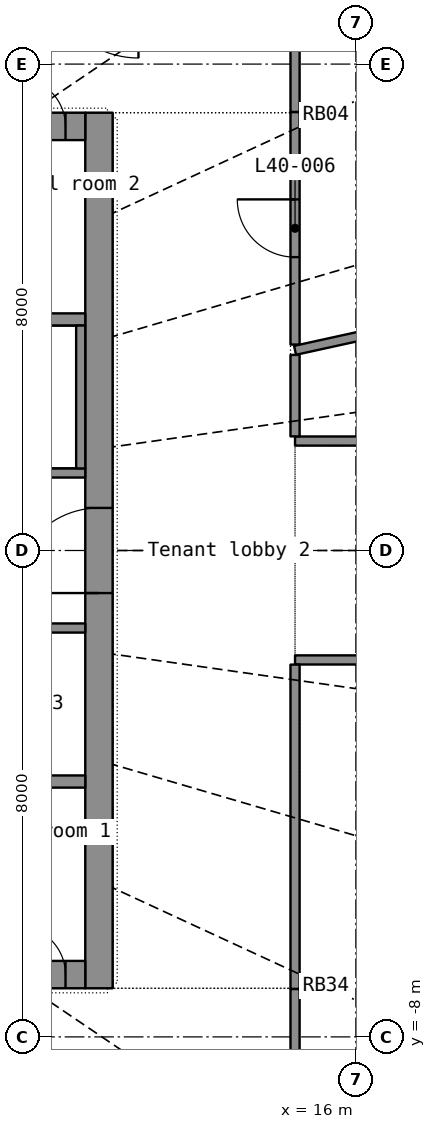
"""IFC4 building model, lengths in metres.
Left out: names, types, materials, properties, quantities, classifications, styles, units other than length and angle.
Written with IfcOpenShell. Run it as: python <this file> out.ifc"""

import sys

from ifc_helpers import new_model, si_unit, direction, frame, frame_2d, origin, place, context, subcontext, project, spatial, rectangle, extrude, element, fill, save


model = new_model("IFC4")
c1 = context("Model", 3, precision=1e-05, world=origin(), true_north=direction((0.0, 1.0)))
c2 = subcontext(c1, "Body", "Model", "MODEL_VIEW")
j1 = project(units=[si_unit("LENGTHUNIT", "METRE"), si_unit("PLANEANGLEUNIT", "RADIAN")], contexts=[c1])
p1 = place(None, origin())
s1 = spatial("IfcSite", under=j1, at=p1, CompositionType="ELEMENT")
p2 = place(p1, origin())
s2 = spatial("IfcBuilding", under=s1, at=p2, CompositionType="ELEMENT")
p3 = place(p2, frame((0.0, 0.0, 168.2)))
s3 = spatial("IfcBuildingStorey", under=s2, at=p3, CompositionType="ELEMENT", Elevation=168.2)
p4 = place(p3, frame((11.775, -7.2, 0.0), z_axis=(0.0, 0.0, 1.0), x_axis=(0.0, 1.0, 0.0)))
e1 = element("IfcWall", 1, at=p4, inside=s3, PredefinedType="SHEAR", context=c2, shape_type="SweptSolid", body=[
    extrude(rectangle(XDim=14.4, YDim=0.45, at=frame_2d((7.2, 0.0))), origin(), (0.0, 0.0, 1.0), 3.3),
])
p5 = place(p4, frame((6.5, 0.0, 0.0)))
e2 = element("IfcOpeningElement", 2, at=p5, cuts=e1, PredefinedType="OPENING", context=c2, shape_type="SweptSolid", body=[
    extrude(rectangle(XDim=1.4, YDim=2.2, at=frame_2d((0.7, 1.1))), frame((0.0, 0.235, 0.0), z_axis=(0.0, -1.0, 0.0), x_axis=(1.0, 0.0, 0.0)), (0.0, 0.0, 1.0), 0.47),
])
p6 = place(p3, frame((-11.55, -6.975, 0.0), z_axis=(0.0, 0.0, 1.0), x_axis=(1.0, 0.0, 0.0)))
e3 = element("IfcWall", 3, at=p6, inside=s3, PredefinedType="SHEAR", context=c2, shape_type="SweptSolid", body=[
    extrude(rectangle(XDim=23.1, YDim=0.45, at=frame_2d((11.55, 0.0))), origin(), (0.0, 0.0, 1.0), 3.3),
])
p7 = place(p6, frame((20.0, 0.0, 0.0)))
e4 = element("IfcOpeningElement", 4, at=p7, cuts=e3, PredefinedType="OPENING", context=c2, shape_type="SweptSolid", body=[
    extrude(rectangle(XDim=1.1, YDim=2.2, at=frame_2d((0.55, 1.1))), frame((0.0, 0.235, 0.0), z_axis=(0.0, -1.0, 0.0), x_axis=(1.0, 0.0, 0.0)), (0.0, 0.0, 1.0), 0.47),
])
p8 = place(p6, frame((4.1, 0.0, 0.0)))
e5 = element("IfcOpeningElement", 5, at=p8, cuts=e3, PredefinedType="OPENING", context=c2, shape_type="SweptSolid", body=[
    extrude(rectangle(XDim=0.9, YDim=2.1, at=frame_2d((0.45, 1.05))), frame((0.0, 0.235, 0.0), z_axis=(0.0, -1.0, 0.0), x_axis=(1.0, 0.0, 0.0)), (0.0, 0.0, 1.0), 0.47),
])
p9 = place(p6, frame((11.1, 0.0, 0.0)))
e6 = element("IfcOpeningElement", 6, at=p9, cuts=e3, PredefinedType="OPENING", context=c2, shape_type="SweptSolid", body=[
    extrude(rectangle(XDim=0.9, YDim=2.1, at=frame_2d((0.45, 1.05))), frame((0.0, 0.235, 0.0), z_axis=(0.0, -1.0, 0.0), x_axis=(1.0, 0.0, 0.0)), (0.0, 0.0, 1.0), 0.47),
])
p10 = place(p6, frame((17.1, 0.0, 0.0)))
e7 = element("IfcOpeningElement", 7, at=p10, cuts=e3, PredefinedType="OPENING", context=c2, shape_type="SweptSolid", body=[
    extrude(rectangle(XDim=0.9, YDim=2.1, at=frame_2d((0.45, 1.05))), frame((0.0, 0.235, 0.0), z_axis=(0.0, -1.0, 0.0), x_axis=(1.0, 0.0, 0.0)), (0.0, 0.0, 1.0), 0.47),
])
p11 = place(p6, frame((0.325, 0.0, 0.0)))
e8 = element("IfcOpeningElement", 8, at=p11, cuts=e3, PredefinedType="OPENING", context=c2, shape_type="SweptSolid", body=[
    extrude(rectangle(XDim=0.8, YDim=2.05, at=frame_2d((0.4, 1.025))), frame((0.0, 0.235, 0.0), z_axis=(0.0, -1.0, 0.0), x_axis=(1.0, 0.0, 0.0)), (0.0, 0.0, 1.0), 0.47),
])
p12 = place(p6, frame((21.975, 0.0, 0.0)))
e9 = element("IfcOpeningElement", 9, at=p12, cuts=e3, PredefinedType="OPENING", context=c2, shape_type="SweptSolid", body=[
    extrude(rectangle(XDim=0.8, YDim=2.05, at=frame_2d((0.4, 1.025))), frame((0.0, 0.235, 0.0), z_axis=(0.0, -1.0, 0.0), x_axis=(1.0, 0.0, 0.0)), (0.0, 0.0, 1.0), 0.47),
])
p13 = place(p3, frame((-11.55, 6.975, 0.0), z_axis=(0.0, 0.0, 1.0), x_axis=(1.0, 0.0, 0.0)))
e10 = element("IfcWall", 10, at=p13, inside=s3, PredefinedType="SHEAR", context=c2, shape_type="SweptSolid", body=[
    extrude(rectangle(XDim=23.1, YDim=0.45, at=frame_2d((11.55, 0.0))), origin(), (0.0, 0.0, 1.0), 3.3),
])
p14 = place(p13, frame((2.0, 0.0, 0.0)))
e11 = element("IfcOpeningElement", 11, at=p14, cuts=e10, PredefinedType="OPENING", context=c2, shape_type="SweptSolid", body=[
    extrude(rectangle(XDim=1.1, YDim=2.2, at=frame_2d((0.55, 1.1))), frame((0.0, 0.235, 0.0), z_axis=(0.0, -1.0, 0.0), x_axis=(1.0, 0.0, 0.0)), (0.0, 0.0, 1.0), 0.47),
])
p15 = place(p13, frame((6.0, 0.0, 0.0)))
e12 = element("IfcOpeningElement", 12, at=p15, cuts=e10, PredefinedType="OPENING", context=c2, shape_type="SweptSolid", body=[
    extrude(rectangle(XDim=1.1, YDim=2.2, at=frame_2d((0.55, 1.1))), frame((0.0, 0.235, 0.0), z_axis=(0.0, -1.0, 0.0), x_axis=(1.0, 0.0, 0.0)), (0.0, 0.0, 1.0), 0.47),
])
p16 = place(p13, frame((8.0, 0.0, 0.0)))
e13 = element("IfcOpeningElement", 13, at=p16, cuts=e10, PredefinedType="OPENING", context=c2, shape_type="SweptSolid", body=[
    extrude(rectangle(XDim=1.1, YDim=2.2, at=frame_2d((0.55, 1.1))), frame((0.0, 0.235, 0.0), z_axis=(0.0, -1.0, 0.0), x_axis=(1.0, 0.0, 0.0)), (0.0, 0.0, 1.0), 0.47),
])
p17 = place(p13, frame((10.0, 0.0, 0.0)))
e14 = element("IfcOpeningElement", 14, at=p17, cuts=e10, PredefinedType="OPENING", context=c2, shape_type="SweptSolid", body=[
    extrude(rectangle(XDim=1.1, YDim=2.2, at=frame_2d((0.55, 1.1))), frame((0.0, 0.235, 0.0), z_axis=(0.0, -1.0, 0.0), x_axis=(1.0, 0.0, 0.0)), (0.0, 0.0, 1.0), 0.47),
])
p18 = place(p13, frame((12.0, 0.0, 0.0)))
e15 = element("IfcOpeningElement", 15, at=p18, cuts=e10, PredefinedType="OPENING", context=c2, shape_type="SweptSolid", body=[
    extrude(rectangle(XDim=1.1, YDim=2.2, at=frame_2d((0.55, 1.1))), frame((0.0, 0.235, 0.0), z_axis=(0.0, -1.0, 0.0), x_axis=(1.0, 0.0, 0.0)), (0.0, 0.0, 1.0), 0.47),
])
p19 = place(p13, frame((14.0, 0.0, 0.0)))
e16 = element("IfcOpeningElement", 16, at=p19, cuts=e10, PredefinedType="OPENING", context=c2, shape_type="SweptSolid", body=[
    extrude(rectangle(XDim=1.1, YDim=2.2, at=frame_2d((0.55, 1.1))), frame((0.0, 0.235, 0.0), z_axis=(0.0, -1.0, 0.0), x_axis=(1.0, 0.0, 0.0)), (0.0, 0.0, 1.0), 0.47),
])
p20 = place(p13, frame((16.0, 0.0, 0.0)))
e17 = element("IfcOpeningElement", 17, at=p20, cuts=e10, PredefinedType="OPENING", context=c2, shape_type="SweptSolid", body=[
    extrude(rectangle(XDim=1.1, YDim=2.2, at=frame_2d((0.55, 1.1))), frame((0.0, 0.235, 0.0), z_axis=(0.0, -1.0, 0.0), x_axis=(1.0, 0.0, 0.0)), (0.0, 0.0, 1.0), 0.47),
])
p21 = place(p13, frame((18.0, 0.0, 0.0)))
e18 = element("IfcOpeningElement", 18, at=p21, cuts=e10, PredefinedType="OPENING", context=c2, shape_type="SweptSolid", body=[
    extrude(rectangle(XDim=1.1, YDim=2.2, at=frame_2d((0.55, 1.1))), frame((0.0, 0.235, 0.0), z_axis=(0.0, -1.0, 0.0), x_axis=(1.0, 0.0, 0.0)), (0.0, 0.0, 1.0), 0.47),
])
p22 = place(p13, frame((20.0, 0.0, 0.0)))
e19 = element("IfcOpeningElement", 19, at=p22, cuts=e10, PredefinedType="OPENING", context=c2, shape_type="SweptSolid", body=[
    extrude(rectangle(XDim=1.1, YDim=2.2, at=frame_2d((0.55, 1.1))), frame((0.0, 0.235, 0.0), z_axis=(0.0, -1.0, 0.0), x_axis=(1.0, 0.0, 0.0)), (0.0, 0.0, 1.0), 0.47),
])
p23 = place(p13, frame((4.1, 0.0, 0.0)))
e20 = element("IfcOpeningElement", 20, at=p23, cuts=e10, PredefinedType="OPENING", context=c2, shape_type="SweptSolid", body=[
    extrude(rectangle(XDim=0.9, YDim=2.1, at=frame_2d((0.45, 1.05))), frame((0.0, 0.235, 0.0), z_axis=(0.0, -1.0, 0.0), x_axis=(1.0, 0.0, 0.0)), (0.0, 0.0, 1.0), 0.47),
])
p24 = place(p13, frame((0.325, 0.0, 0.0)))
e21 = element("IfcOpeningElement", 21, at=p24, cuts=e10, PredefinedType="OPENING", context=c2, shape_type="SweptSolid", body=[
    extrude(rectangle(XDim=0.8, YDim=2.05, at=frame_2d((0.4, 1.025))), frame((0.0, 0.235, 0.0), z_axis=(0.0, -1.0, 0.0), x_axis=(1.0, 0.0, 0.0)), (0.0, 0.0, 1.0), 0.47),
])
p25 = place(p13, frame((21.975, 0.0, 0.0)))
e22 = element("IfcOpeningElement", 22, at=p25, cuts=e10, PredefinedType="OPENING", context=c2, shape_type="SweptSolid", body=[
    extrude(rectangle(XDim=0.8, YDim=2.05, at=frame_2d((0.4, 1.025))), frame((0.0, 0.235, 0.0), z_axis=(0.0, -1.0, 0.0), x_axis=(1.0, 0.0, 0.0)), (0.0, 0.0, 1.0), 0.47),
])
for number, where, z_axis, x_axis in (
    (23, (-11.55, -3.8, 0.0), (0.0, 0.0, 1.0), (1.0, 0.0, 0.0)),
    (24, (-11.55, 3.8, 0.0), (0.0, 0.0, 1.0), (1.0, 0.0, 0.0)),
):
    element("IfcWall", number, at=place(p3, frame(where, z_axis=z_axis, x_axis=x_axis)), inside=s3, PredefinedType="SHEAR", context=c2, shape_type="SweptSolid", body=[
        extrude(rectangle(XDim=23.1, YDim=0.2, at=frame_2d((11.55, 0.0))), origin(), (0.0, 0.0, 1.0), 3.3),
    ])
p26 = place(p3, frame((3.0, -1.275, 0.0), z_axis=(0.0, 0.0, 1.0), x_axis=(1.0, 0.0, 0.0)))
e25 = element("IfcWall", 25, at=p26, inside=s3, PredefinedType="PARTITIONING", context=c2, shape_type="SweptSolid", body=[
    extrude(rectangle(XDim=8.55, YDim=0.15, at=frame_2d((4.275, 0.0))), origin(), (0.0, 0.0, 1.0), 3.3),
])
p27 = place(p26, frame((0.812, 0.0, 0.0)))
e26 = element("IfcOpeningElement", 26, at=p27, cuts=e25, PredefinedType="OPENING", context=c2, shape_type="SweptSolid", body=[
    extrude(rectangle(XDim=0.85, YDim=2.1, at=frame_2d((0.425, 1.05))), frame((0.0, 0.085, 0.0), z_axis=(0.0, -1.0, 0.0), x_axis=(1.0, 0.0, 0.0)), (0.0, 0.0, 1.0), 0.17),
])
p28 = place(p26, frame((3.083, 0.0, 0.0)))
e27 = element("IfcOpeningElement", 27, at=p28, cuts=e25, PredefinedType="OPENING", context=c2, shape_type="SweptSolid", body=[
    extrude(rectangle(XDim=0.9, YDim=2.1, at=frame_2d((0.45, 1.05))), frame((0.0, 0.085, 0.0), z_axis=(0.0, -1.0, 0.0), x_axis=(1.0, 0.0, 0.0)), (0.0, 0.0, 1.0), 0.17),
])
p29 = place(p26, frame((6.12, 0.0, 0.0)))
e28 = element("IfcOpeningElement", 28, at=p29, cuts=e25, PredefinedType="OPENING", context=c2, shape_type="SweptSolid", body=[
    extrude(rectangle(XDim=0.9, YDim=2.1, at=frame_2d((0.45, 1.05))), frame((0.0, 0.085, 0.0), z_axis=(0.0, -1.0, 0.0), x_axis=(1.0, 0.0, 0.0)), (0.0, 0.0, 1.0), 0.17),
])
p30 = place(p3, frame((3.0, 1.275, 0.0), z_axis=(0.0, 0.0, 1.0), x_axis=(1.0, 0.0, 0.0)))
e29 = element("IfcWall", 29, at=p30, inside=s3, PredefinedType="SHEAR", context=c2, shape_type="SweptSolid", body=[
    extrude(rectangle(XDim=8.55, YDim=0.15, at=frame_2d((4.275, 0.0))), origin(), (0.0, 0.0, 1.0), 3.3),
])
p31 = place(p30, frame((2.05, 0.0, 0.0)))
e30 = element("IfcOpeningElement", 30, at=p31, cuts=e29, PredefinedType="OPENING", context=c2, shape_type="SweptSolid", body=[
    extrude(rectangle(XDim=1.1, YDim=2.15, at=frame_2d((0.55, 1.075))), frame((0.0, 0.085, 0.0), z_axis=(0.0, -1.0, 0.0), x_axis=(1.0, 0.0, 0.0)), (0.0, 0.0, 1.0), 0.17),
])
p32 = place(p30, frame((0.45, 0.0, 0.0)))
e31 = element("IfcOpeningElement", 31, at=p32, cuts=e29, PredefinedType="OPENING", context=c2, shape_type="SweptSolid", body=[
    extrude(rectangle(XDim=0.9, YDim=2.1, at=frame_2d((0.45, 1.05))), frame((0.0, 0.085, 0.0), z_axis=(0.0, -1.0, 0.0), x_axis=(1.0, 0.0, 0.0)), (0.0, 0.0, 1.0), 0.17),
])
p33 = place(p3, frame((11.475, 1.35, 0.0), z_axis=(0.0, 0.0, 1.0), x_axis=(0.0, 1.0, 0.0)))
e32 = element("IfcWall", 32, at=p33, inside=s3, PredefinedType="SHEAR", context=c2, shape_type="SweptSolid", body=[
    extrude(rectangle(XDim=2.35, YDim=0.15, at=frame_2d((1.175, 0.0))), origin(), (0.0, 0.0, 1.0), 3.3),
])
p34 = place(p3, frame((22.608, 4.962, 0.0), z_axis=(0.0, 0.0, 1.0), x_axis=(-0.976750106, -0.21438104, 0.0)))
e33 = element("IfcWall", 33, at=p34, inside=s3, PredefinedType="PARTITIONING", context=c2, shape_type="SweptSolid", body=[
    extrude(rectangle(XDim=7.79, YDim=0.15, at=frame_2d((3.895, 0.0))), origin(), (0.0, 0.0, 1.0), 2.4),
])
p35 = place(p3, frame((15.0, -1.8, 0.0), z_axis=(0.0, 0.0, 1.0), x_axis=(1.0, 0.0, 0.0)))
e34 = element("IfcWall", 34, at=p35, inside=s3, PredefinedType="PARTITIONING", context=c2, shape_type="SweptSolid", body=[
    extrude(rectangle(XDim=5.766, YDim=0.15, at=frame_2d((2.883, 0.0))), origin(), (0.0, 0.0, 1.0), 2.4),
])
p36 = place(p35, frame((2.283, 0.0, 0.0)))
e35 = element("IfcOpeningElement", 35, at=p36, cuts=e34, PredefinedType="OPENING", context=c2, shape_type="SweptSolid", body=[
    extrude(rectangle(XDim=1.2, YDim=2.2, at=frame_2d((0.6, 1.1))), frame((0.0, 0.085, 0.0), z_axis=(0.0, -1.0, 0.0), x_axis=(1.0, 0.0, 0.0)), (0.0, 0.0, 1.0), 0.17),
])
p37 = place(p3, frame((20.766, 1.8, 0.0), z_axis=(0.0, 0.0, 1.0), x_axis=(-1.0, 0.0, 0.0)))
e36 = element("IfcWall", 36, at=p37, inside=s3, PredefinedType="PARTITIONING", context=c2, shape_type="SweptSolid", body=[
    extrude(rectangle(XDim=5.766, YDim=0.15, at=frame_2d((2.883, 0.0))), origin(), (0.0, 0.0, 1.0), 2.4),
])
p38 = place(p37, frame((2.283, 0.0, 0.0)))
e37 = element("IfcOpeningElement", 37, at=p38, cuts=e36, PredefinedType="OPENING", context=c2, shape_type="SweptSolid", body=[
    extrude(rectangle(XDim=1.2, YDim=2.2, at=frame_2d((0.6, 1.1))), frame((0.0, 0.085, 0.0), z_axis=(0.0, -1.0, 0.0), x_axis=(1.0, 0.0, 0.0)), (0.0, 0.0, 1.0), 0.17),
])
p39 = place(p3, frame((15.0, -7.212, 0.0), z_axis=(0.0, 0.0, 1.0), x_axis=(0.0, 1.0, 0.0)))
e38 = element("IfcWall", 38, at=p39, inside=s3, PredefinedType="PARTITIONING", context=c2, shape_type="SweptSolid", body=[
    extrude(rectangle(XDim=5.335, YDim=0.15, at=frame_2d((2.667, 0.0))), origin(), (0.0, 0.0, 1.0), 2.4),
])
p40 = place(p3, frame((15.0, 3.387, 0.0), z_axis=(0.0, 0.0, 1.0), x_axis=(0.0, 1.0, 0.0)))
e39 = element("IfcWall", 39, at=p40, inside=s3, PredefinedType="PARTITIONING", context=c2, shape_type="SweptSolid", body=[
    extrude(rectangle(XDim=3.824, YDim=0.15, at=frame_2d((1.912, 0.0))), origin(), (0.0, 0.0, 1.0), 2.4),
])
p41 = place(p40, frame((1.437, 0.0, 0.0)))
e40 = element("IfcOpeningElement", 40, at=p41, cuts=e39, PredefinedType="OPENING", context=c2, shape_type="SweptSolid", body=[
    extrude(rectangle(XDim=0.95, YDim=2.15, at=frame_2d((0.475, 1.075))), frame((0.0, 0.085, 0.0), z_axis=(0.0, -1.0, 0.0), x_axis=(1.0, 0.0, 0.0)), (0.0, 0.0, 1.0), 0.17),
])
p42 = place(p3, frame((15.0, -9.523, 0.0), z_axis=(0.0, 0.0, 1.0), x_axis=(0.0, 1.0, 0.0)))
e41 = element("IfcWall", 41, at=p42, inside=s3, PredefinedType="PARTITIONING", context=c2, shape_type="SweptSolid", body=[
    extrude(rectangle(XDim=2.31, YDim=0.15, at=frame_2d((1.155, 0.0))), origin(), (0.0, 0.0, 1.0), 2.4),
])
p43 = place(p3, frame((15.0, 1.877, 0.0), z_axis=(0.0, 0.0, 1.0), x_axis=(0.0, 1.0, 0.0)))
e42 = element("IfcWall", 42, at=p43, inside=s3, PredefinedType="PARTITIONING", context=c2, shape_type="SweptSolid", body=[
    extrude(rectangle(XDim=1.34, YDim=0.15, at=frame_2d((0.67, 0.0))), origin(), (0.0, 0.0, 1.0), 2.4),
])
p44 = place(p3, frame((15.0, 7.213, 0.0), z_axis=(0.0, 0.0, 1.0), x_axis=(0.0, 1.0, 0.0)))
e43 = element("IfcWall", 43, at=p44, inside=s3, PredefinedType="PARTITIONING", context=c2, shape_type="SweptSolid", body=[
    extrude(rectangle(XDim=1.323, YDim=0.15, at=frame_2d((0.662, 0.0))), origin(), (0.0, 0.0, 1.0), 2.4),
])
p45 = place(p12, origin())
e44 = element("IfcDoor", 44, at=p45, inside=s3, OperationType="SINGLE_SWING_LEFT", PredefinedType="DOOR", context=c2, shape_type="SweptSolid", body=[
    extrude(rectangle(XDim=0.8, YDim=2.05, at=frame_2d((0.4, 1.025))), frame((0.0, 0.025, 0.0), z_axis=(0.0, -1.0, 0.0), x_axis=(1.0, 0.0, 0.0)), (0.0, 0.0, 1.0), 0.05),
])
fill(e9, e44)
p46 = place(p25, origin())
e45 = element("IfcDoor", 45, at=p46, inside=s3, OperationType="SINGLE_SWING_LEFT", PredefinedType="DOOR", context=c2, shape_type="SweptSolid", body=[
    extrude(rectangle(XDim=0.8, YDim=2.05, at=frame_2d((0.4, 1.025))), frame((0.0, 0.025, 0.0), z_axis=(0.0, -1.0, 0.0), x_axis=(1.0, 0.0, 0.0)), (0.0, 0.0, 1.0), 0.05),
])
fill(e22, e45)
p47 = place(p5, origin())
e46 = element("IfcDoor", 46, at=p47, inside=s3, OperationType="DOUBLE_DOOR_SINGLE_SWING", PredefinedType="DOOR", context=c2, shape_type="SweptSolid", body=[
    extrude(rectangle(XDim=1.4, YDim=2.2, at=frame_2d((0.7, 1.1))), frame((0.0, 0.025, 0.0), z_axis=(0.0, -1.0, 0.0), x_axis=(1.0, 0.0, 0.0)), (0.0, 0.0, 1.0), 0.05),
])
fill(e2, e46)
p48 = place(p41, origin())
e47 = element("IfcDoor", 47, at=p48, inside=s3, OperationType="SINGLE_SWING_RIGHT", PredefinedType="DOOR", context=c2, shape_type="SweptSolid", body=[
    extrude(rectangle(XDim=0.95, YDim=2.15, at=frame_2d((0.475, 1.075))), frame((0.0, 0.025, 0.0), z_axis=(0.0, -1.0, 0.0), x_axis=(1.0, 0.0, 0.0)), (0.0, 0.0, 1.0), 0.05),
])
fill(e40, e47)
save(model, sys.argv[1])
